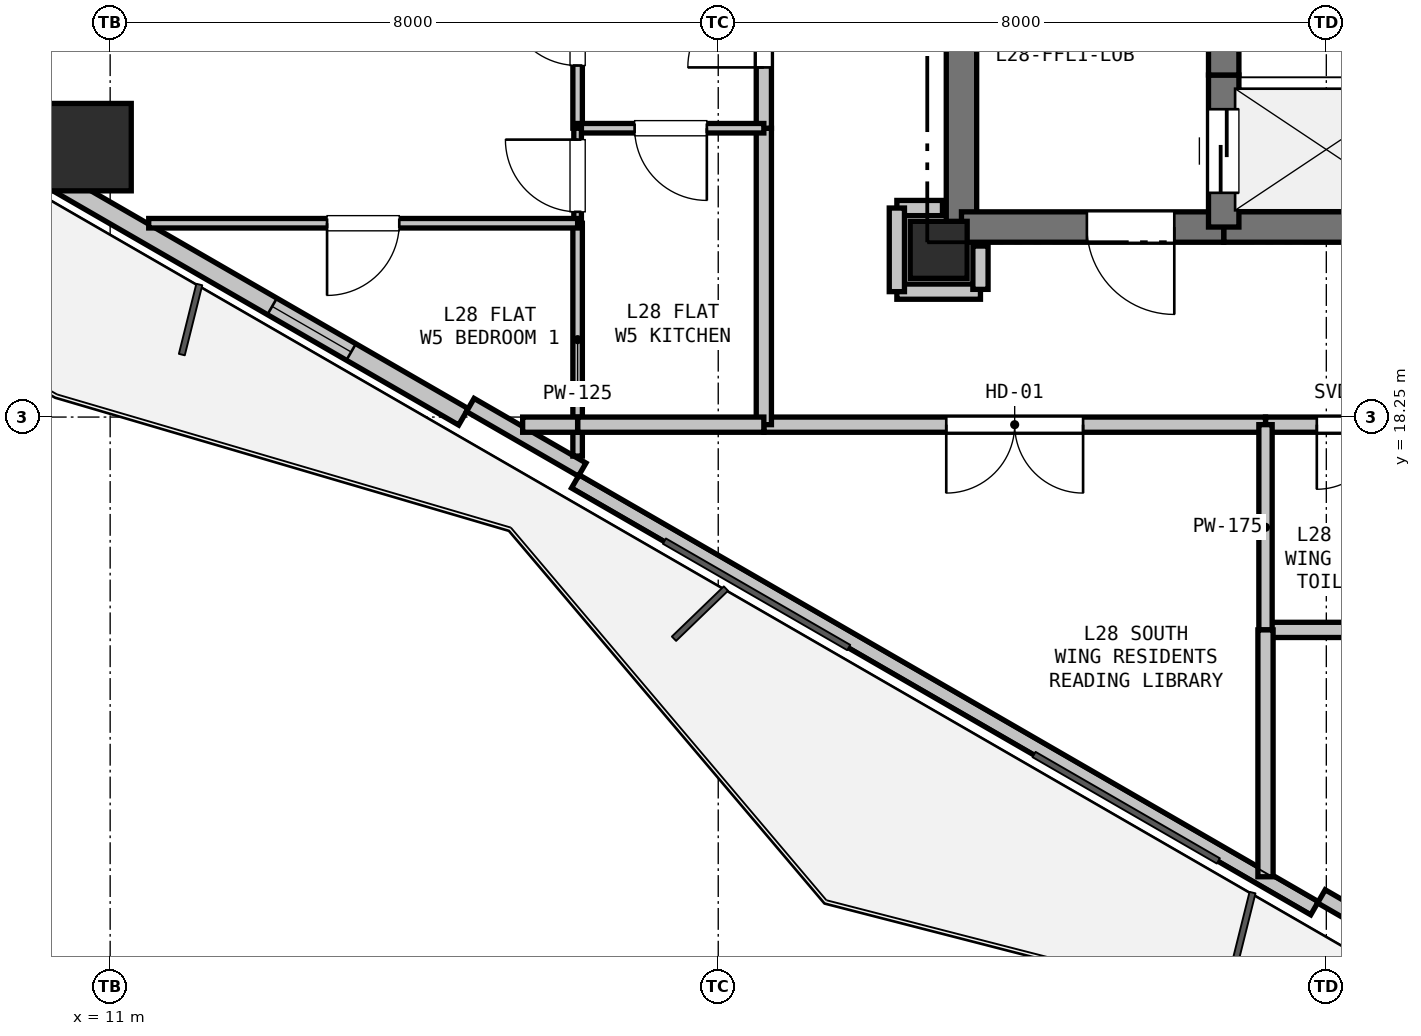
"""IFC4 building model, lengths in metres.
Left out: names, types, materials, properties, quantities, classifications, styles, units other than length and angle.
Written with IfcOpenShell. Run it as: python <this file> out.ifc"""

import sys

from ifc_helpers import new_model, si_unit, direction, frame, frame_2d, origin, origin_2d, place, context, subcontext, project, spatial, rectangle, hollow_rectangle, extrude, element, fill, save


model = new_model("IFC4")
c1 = context("Model", 3, precision=1e-05, world=origin(), true_north=direction((0.0, 1.0)))
c2 = subcontext(c1, "Body", "Model", "MODEL_VIEW")
j1 = project(units=[si_unit("LENGTHUNIT", "METRE"), si_unit("PLANEANGLEUNIT", "RADIAN")], contexts=[c1])
p1 = place(None, origin())
s1 = spatial("IfcSite", under=j1, at=p1, CompositionType="ELEMENT")
p2 = place(p1, origin())
s2 = spatial("IfcBuilding", under=s1, at=p2, CompositionType="ELEMENT")
p3 = place(p2, frame((0.0, 0.0, 103.2)))
s3 = spatial("IfcBuildingStorey", under=s2, at=p3, CompositionType="ELEMENT", Elevation=103.2)
p4 = place(p3, frame((21.9, 20.45, 0.0), z_axis=(0.0, 0.0, 1.0), x_axis=(1.0, 0.0, 0.0)))
e1 = element("IfcColumn", 1, at=p4, inside=s3, PredefinedType="COLUMN", context=c2, shape_type="SweptSolid", body=[
    extrude(rectangle(XDim=0.75, YDim=0.75, at=origin_2d()), origin(), (0.0, 0.0, 1.0), 3.3),
])
p5 = place(p3, frame((10.702, 21.801, 0.0), z_axis=(0.0, 0.0, 1.0), x_axis=(1.0, 0.0, 0.0)))
e2 = element("IfcColumn", 2, at=p5, inside=s3, PredefinedType="COLUMN", context=c2, shape_type="SweptSolid", body=[
    extrude(hollow_rectangle(XDim=1.15, YDim=1.15, WallThickness=0.032, at=origin_2d()), origin(), (0.0, 0.0, 1.0), 3.3),
])
p6 = place(p3, frame((26.845, 11.788, 0.0), z_axis=(0.0, 0.0, 1.0), x_axis=(-0.866027010039, 0.499997217876, 0.0)))
e3 = element("IfcWall", 3, at=p6, inside=s3, PredefinedType="PARAPET", context=c2, shape_type="SweptSolid", body=[
    extrude(rectangle(XDim=11.229, YDim=0.2, at=frame_2d((5.615, 0.0))), origin(), (0.0, 0.0, 1.0), 0.2),
])
p7 = place(p3, frame((15.648, 18.253, 0.0), z_axis=(0.0, 0.0, 1.0), x_axis=(-0.866023023012, 0.500004123596, 0.0)))
e4 = element("IfcWall", 4, at=p7, inside=s3, PredefinedType="SOLIDWALL", context=c2, shape_type="SweptSolid", body=[
    extrude(rectangle(XDim=11.93, YDim=0.25, at=frame_2d((5.965, 0.0))), origin(), (0.0, 0.0, 1.0), 2.67),
])
p8 = place(p7, frame((1.706, 0.0, 0.9)))
e5 = element("IfcOpeningElement", 5, at=p8, cuts=e4, PredefinedType="OPENING", context=c2, shape_type="SweptSolid", body=[
    extrude(rectangle(XDim=1.2, YDim=1.4, at=frame_2d((0.6, 0.7))), frame((0.0, 0.135, 0.0), z_axis=(0.0, -1.0, 0.0), x_axis=(1.0, 0.0, 0.0)), (0.0, 0.0, 1.0), 0.27),
])
p9 = place(p3, frame((28.407, 11.094, 0.0), z_axis=(0.0, 0.0, 1.0), x_axis=(-0.86605165483, 0.499954529098, 0.0)))
e6 = element("IfcWall", 6, at=p9, inside=s3, PredefinedType="PARAPET", context=c2, shape_type="SweptSolid", body=[
    extrude(rectangle(XDim=1.7, YDim=0.2, at=frame_2d((0.85, 0.0))), origin(), (0.0, 0.0, 1.0), 2.67),
])
p10 = place(p3, frame((17.21, 17.559, 0.0), z_axis=(0.0, 0.0, 1.0), x_axis=(-0.866025371046, 0.500000056704, 0.0)))
e7 = element("IfcWall", 7, at=p10, inside=s3, PredefinedType="PARAPET", context=c2, shape_type="SweptSolid", body=[
    extrude(rectangle(XDim=1.7, YDim=0.2, at=frame_2d((0.85, 0.0))), origin(), (0.0, 0.0, 1.0), 2.67),
])
p11 = place(p3, frame((22.2, 20.75, 0.0), z_axis=(0.0, 0.0, 1.0), x_axis=(0.0, 1.0, 0.0)))
e8 = element("IfcWall", 8, at=p11, inside=s3, PredefinedType="SHEAR", context=c2, shape_type="SweptSolid", body=[
    extrude(rectangle(XDim=4.65, YDim=0.4, at=frame_2d((2.325, 0.0))), origin(), (0.0, 0.0, 1.0), 3.05),
])
p12 = place(p3, frame((28.35, 20.75, 0.0), z_axis=(0.0, 0.0, 1.0), x_axis=(-1.0, 0.0, 0.0)))
e9 = element("IfcWall", 9, at=p12, inside=s3, PredefinedType="SHEAR", context=c2, shape_type="SweptSolid", body=[
    extrude(rectangle(XDim=2.7, YDim=0.4, at=frame_2d((1.35, 0.0))), origin(), (0.0, 0.0, 1.0), 3.05),
])
p13 = place(p3, frame((25.65, 20.75, 0.0), z_axis=(0.0, 0.0, 1.0), x_axis=(-1.0, 0.0, 0.0)))
e10 = element("IfcWall", 10, at=p13, inside=s3, PredefinedType="SHEAR", context=c2, shape_type="SweptSolid", body=[
    extrude(rectangle(XDim=3.45, YDim=0.4, at=frame_2d((1.725, 0.0))), origin(), (0.0, 0.0, 1.0), 3.05),
])
p14 = place(p13, frame((0.65, 0.0, 0.0)))
e11 = element("IfcOpeningElement", 11, at=p14, cuts=e10, PredefinedType="OPENING", context=c2, shape_type="SweptSolid", body=[
    extrude(rectangle(XDim=1.15, YDim=2.15, at=frame_2d((0.575, 1.075))), frame((0.0, 0.21, 0.0), z_axis=(0.0, -1.0, 0.0), x_axis=(1.0, 0.0, 0.0)), (0.0, 0.0, 1.0), 0.42),
])
p15 = place(p3, frame((25.65, 20.75, 0.0), z_axis=(0.0, 0.0, 1.0), x_axis=(0.0, 1.0, 0.0)))
e12 = element("IfcWall", 12, at=p15, inside=s3, PredefinedType="SHEAR", context=c2, shape_type="SweptSolid", body=[
    extrude(rectangle(XDim=2.0, YDim=0.4, at=frame_2d((1.0, 0.0))), origin(), (0.0, 0.0, 1.0), 3.05),
])
p16 = place(p15, frame((0.45, 0.0, 0.0)))
e13 = element("IfcOpeningElement", 13, at=p16, cuts=e12, PredefinedType="OPENING", context=c2, shape_type="SweptSolid", body=[
    extrude(rectangle(XDim=1.1, YDim=2.15, at=frame_2d((0.55, 1.075))), frame((0.0, 0.21, 0.0), z_axis=(0.0, -1.0, 0.0), x_axis=(1.0, 0.0, 0.0)), (0.0, 0.0, 1.0), 0.42),
])
p17 = place(p3, frame((25.65, 22.75, 0.0), z_axis=(0.0, 0.0, 1.0), x_axis=(0.0, 1.0, 0.0)))
e14 = element("IfcWall", 14, at=p17, inside=s3, PredefinedType="SHEAR", context=c2, shape_type="SweptSolid", body=[
    extrude(rectangle(XDim=2.8, YDim=0.4, at=frame_2d((1.4, 0.0))), origin(), (0.0, 0.0, 1.0), 3.05),
])
p18 = place(p3, frame((21.35, 19.9, 0.0), z_axis=(0.0, 0.0, 1.0), x_axis=(1.0, 0.0, 0.0)))
e15 = element("IfcWall", 15, at=p18, inside=s3, PredefinedType="PARTITIONING", context=c2, shape_type="SweptSolid", body=[
    extrude(rectangle(XDim=1.1, YDim=0.2, at=frame_2d((0.55, 0.0))), origin(), (0.0, 0.0, 1.0), 2.423),
])
p19 = place(p3, frame((22.45, 19.93, 0.0), z_axis=(0.0, 0.0, 1.0), x_axis=(0.0, 1.0, 0.0)))
e16 = element("IfcWall", 16, at=p19, inside=s3, PredefinedType="PARTITIONING", context=c2, shape_type="SweptSolid", body=[
    extrude(rectangle(XDim=0.57, YDim=0.2, at=frame_2d((0.285, 0.0))), origin(), (0.0, 0.0, 1.0), 2.423),
])
p20 = place(p3, frame((28.4, 18.15, 0.0), z_axis=(0.0, 0.0, 1.0), x_axis=(-1.0, 0.0, 0.0)))
e17 = element("IfcWall", 17, at=p20, inside=s3, PredefinedType="PARTITIONING", context=c2, shape_type="SweptSolid", body=[
    extrude(rectangle(XDim=2.2, YDim=0.2, at=frame_2d((1.1, 0.0))), origin(), (0.0, 0.0, 1.0), 3.05),
])
p21 = place(p20, frame((0.675, 0.0, 0.0)))
e18 = element("IfcOpeningElement", 18, at=p21, cuts=e17, PredefinedType="OPENING", context=c2, shape_type="SweptSolid", body=[
    extrude(rectangle(XDim=0.85, YDim=2.1, at=frame_2d((0.425, 1.05))), frame((0.0, 0.11, 0.0), z_axis=(0.0, -1.0, 0.0), x_axis=(1.0, 0.0, 0.0)), (0.0, 0.0, 1.0), 0.22),
])
p22 = place(p3, frame((26.2, 18.15, 0.0), z_axis=(0.0, 0.0, 1.0), x_axis=(-1.0, 0.0, 0.0)))
e19 = element("IfcWall", 19, at=p22, inside=s3, PredefinedType="PARTITIONING", context=c2, shape_type="SweptSolid", body=[
    extrude(rectangle(XDim=6.6, YDim=0.2, at=frame_2d((3.3, 0.0))), origin(), (0.0, 0.0, 1.0), 2.423),
])
p23 = place(p22, frame((2.4, 0.0, 0.0)))
e20 = element("IfcOpeningElement", 20, at=p23, cuts=e19, PredefinedType="OPENING", context=c2, shape_type="SweptSolid", body=[
    extrude(rectangle(XDim=1.8, YDim=2.2, at=frame_2d((0.9, 1.1))), frame((0.0, 0.11, 0.0), z_axis=(0.0, -1.0, 0.0), x_axis=(1.0, 0.0, 0.0)), (0.0, 0.0, 1.0), 0.22),
])
p24 = place(p3, frame((19.6, 18.15, 0.0), z_axis=(0.0, 0.0, 1.0), x_axis=(0.0, 1.0, 0.0)))
e21 = element("IfcWall", 21, at=p24, inside=s3, PredefinedType="PARTITIONING", context=c2, shape_type="SweptSolid", body=[
    extrude(rectangle(XDim=3.9, YDim=0.2, at=frame_2d((1.95, 0.0))), origin(), (0.0, 0.0, 1.0), 2.423),
])
p25 = place(p3, frame((19.6, 22.05, 0.0), z_axis=(0.0, 0.0, 1.0), x_axis=(0.0, 1.0, 0.0)))
e22 = element("IfcWall", 22, at=p25, inside=s3, PredefinedType="PARTITIONING", context=c2, shape_type="SweptSolid", body=[
    extrude(rectangle(XDim=2.6, YDim=0.2, at=frame_2d((1.3, 0.0))), origin(), (0.0, 0.0, 1.0), 3.05),
])
p26 = place(p25, frame((0.8, 0.0, 0.0)))
e23 = element("IfcOpeningElement", 23, at=p26, cuts=e22, PredefinedType="OPENING", context=c2, shape_type="SweptSolid", body=[
    extrude(rectangle(XDim=1.0, YDim=2.15, at=frame_2d((0.5, 1.075))), frame((0.0, 0.11, 0.0), z_axis=(0.0, -1.0, 0.0), x_axis=(1.0, 0.0, 0.0)), (0.0, 0.0, 1.0), 0.22),
])
p27 = place(p3, frame((21.95, 21.0, 0.0), z_axis=(0.0, 0.0, 1.0), x_axis=(-1.0, 0.0, 0.0)))
e24 = element("IfcWall", 24, at=p27, inside=s3, PredefinedType="PARTITIONING", context=c2, shape_type="SweptSolid", body=[
    extrude(rectangle(XDim=0.6, YDim=0.2, at=frame_2d((0.3, 0.0))), origin(), (0.0, 0.0, 1.0), 2.498),
])
p28 = place(p3, frame((21.35, 21.0, 0.0), z_axis=(0.0, 0.0, 1.0), x_axis=(0.0, -1.0, 0.0)))
e25 = element("IfcWall", 25, at=p28, inside=s3, PredefinedType="PARTITIONING", context=c2, shape_type="SweptSolid", body=[
    extrude(rectangle(XDim=1.1, YDim=0.2, at=frame_2d((0.55, 0.0))), origin(), (0.0, 0.0, 1.0), 2.423),
])
p29 = place(p3, frame((17.15, 22.05, 0.0), z_axis=(0.0, 0.0, 1.0), x_axis=(0.0, 1.0, 0.0)))
e26 = element("IfcWall", 26, at=p29, inside=s3, PredefinedType="PARTITIONING", context=c2, shape_type="SweptSolid", body=[
    extrude(rectangle(XDim=2.6, YDim=0.125, at=frame_2d((1.3, 0.0))), origin(), (0.0, 0.0, 1.0), 3.05),
])
p30 = place(p29, frame((0.825, 0.0, 0.0)))
e27 = element("IfcOpeningElement", 27, at=p30, cuts=e26, PredefinedType="OPENING", context=c2, shape_type="SweptSolid", body=[
    extrude(rectangle(XDim=0.95, YDim=2.1, at=frame_2d((0.475, 1.05))), frame((0.0, 0.073, 0.0), z_axis=(0.0, -1.0, 0.0), x_axis=(1.0, 0.0, 0.0)), (0.0, 0.0, 1.0), 0.145),
])
p31 = place(p3, frame((19.6, 22.05, 0.0), z_axis=(0.0, 0.0, 1.0), x_axis=(-1.0, 0.0, 0.0)))
e28 = element("IfcWall", 28, at=p31, inside=s3, PredefinedType="PARTITIONING", context=c2, shape_type="SweptSolid", body=[
    extrude(rectangle(XDim=2.45, YDim=0.125, at=frame_2d((1.225, 0.0))), origin(), (0.0, 0.0, 1.0), 3.05),
])
p32 = place(p31, frame((0.75, 0.0, 0.0)))
e29 = element("IfcOpeningElement", 29, at=p32, cuts=e28, PredefinedType="OPENING", context=c2, shape_type="SweptSolid", body=[
    extrude(rectangle(XDim=0.95, YDim=2.1, at=frame_2d((0.475, 1.05))), frame((0.0, 0.073, 0.0), z_axis=(0.0, -1.0, 0.0), x_axis=(1.0, 0.0, 0.0)), (0.0, 0.0, 1.0), 0.145),
])
p33 = place(p3, frame((28.4, 15.45, 0.0), z_axis=(0.0, 0.0, 1.0), x_axis=(-1.0, 0.0, 0.0)))
e30 = element("IfcWall", 30, at=p33, inside=s3, PredefinedType="PARTITIONING", context=c2, shape_type="SweptSolid", body=[
    extrude(rectangle(XDim=2.2, YDim=0.2, at=frame_2d((1.1, 0.0))), origin(), (0.0, 0.0, 1.0), 2.423),
])
p34 = place(p3, frame((26.2, 15.45, 0.0), z_axis=(0.0, 0.0, 1.0), x_axis=(0.0, 1.0, 0.0)))
e31 = element("IfcWall", 31, at=p34, inside=s3, PredefinedType="PLUMBINGWALL", context=c2, shape_type="SweptSolid", body=[
    extrude(rectangle(XDim=2.7, YDim=0.175, at=frame_2d((1.35, 0.0))), origin(), (0.0, 0.0, 1.0), 2.423),
])
p35 = place(p3, frame((17.15, 17.737, 0.0), z_axis=(0.0, 0.0, 1.0), x_axis=(0.0, 1.0, 0.0)))
e32 = element("IfcWall", 32, at=p35, inside=s3, PredefinedType="PARTITIONING", context=c2, shape_type="SweptSolid", body=[
    extrude(rectangle(XDim=3.063, YDim=0.125, at=frame_2d((1.532, 0.0))), origin(), (0.0, 0.0, 1.0), 2.365),
])
p36 = place(p3, frame((17.15, 20.8, 0.0), z_axis=(0.0, 0.0, 1.0), x_axis=(0.0, 1.0, 0.0)))
e33 = element("IfcWall", 33, at=p36, inside=s3, PredefinedType="PARTITIONING", context=c2, shape_type="SweptSolid", body=[
    extrude(rectangle(XDim=1.25, YDim=0.1, at=frame_2d((0.625, 0.0))), origin(), (0.0, 0.0, 1.0), 2.423),
])
p37 = place(p36, frame((0.15, 0.0, 0.0)))
e34 = element("IfcOpeningElement", 34, at=p37, cuts=e33, PredefinedType="OPENING", context=c2, shape_type="SweptSolid", body=[
    extrude(rectangle(XDim=0.95, YDim=2.1, at=frame_2d((0.475, 1.05))), frame((0.0, 0.06, 0.0), z_axis=(0.0, -1.0, 0.0), x_axis=(1.0, 0.0, 0.0)), (0.0, 0.0, 1.0), 0.12),
])
p38 = place(p3, frame((19.6, 18.15, 0.0), z_axis=(0.0, 0.0, 1.0), x_axis=(-1.0, 0.0, 0.0)))
e35 = element("IfcWall", 35, at=p38, inside=s3, PredefinedType="PARTITIONING", context=c2, shape_type="SweptSolid", body=[
    extrude(rectangle(XDim=2.45, YDim=0.2, at=frame_2d((1.225, 0.0))), origin(), (0.0, 0.0, 1.0), 2.365),
])
p39 = place(p3, frame((16.427, 18.15, 0.0), z_axis=(0.0, 0.0, 1.0), x_axis=(1.0, 0.0, 0.0)))
e36 = element("IfcWall", 36, at=p39, inside=s3, PredefinedType="PARTITIONING", context=c2, shape_type="SweptSolid", body=[
    extrude(rectangle(XDim=0.723, YDim=0.2, at=frame_2d((0.362, 0.0))), origin(), (0.0, 0.0, 1.0), 2.365),
])
p40 = place(p3, frame((26.2, 15.45, 0.0), z_axis=(0.0, 0.0, 1.0), x_axis=(0.0, -1.0, 0.0)))
e37 = element("IfcWall", 37, at=p40, inside=s3, PredefinedType="PARTITIONING", context=c2, shape_type="SweptSolid", body=[
    extrude(rectangle(XDim=3.248, YDim=0.2, at=frame_2d((1.624, 0.0))), origin(), (0.0, 0.0, 1.0), 2.365),
])
p41 = place(p3, frame((17.15, 20.8, 0.0), z_axis=(0.0, 0.0, 1.0), x_axis=(-1.0, 0.0, 0.0)))
e38 = element("IfcWall", 38, at=p41, inside=s3, PredefinedType="PARTITIONING", context=c2, shape_type="SweptSolid", body=[
    extrude(rectangle(XDim=5.643, YDim=0.125, at=frame_2d((2.821, 0.0))), origin(), (0.0, 0.0, 1.0), 2.365),
])
p42 = place(p41, frame((2.346, 0.0, 0.0)))
e39 = element("IfcOpeningElement", 39, at=p42, cuts=e38, PredefinedType="OPENING", context=c2, shape_type="SweptSolid", body=[
    extrude(rectangle(XDim=0.95, YDim=2.1, at=frame_2d((0.475, 1.05))), frame((0.0, 0.073, 0.0), z_axis=(0.0, -1.0, 0.0), x_axis=(1.0, 0.0, 0.0)), (0.0, 0.0, 1.0), 0.145),
])
p43 = place(p8, origin())
e40 = element("IfcWindow", 40, at=p43, inside=s3, PartitioningType="SINGLE_PANEL", PredefinedType="WINDOW", context=c2, shape_type="SweptSolid", body=[
    extrude(rectangle(XDim=1.2, YDim=1.4, at=frame_2d((0.6, 0.7))), frame((0.0, 0.03, 0.0), z_axis=(0.0, -1.0, 0.0), x_axis=(1.0, 0.0, 0.0)), (0.0, 0.0, 1.0), 0.06),
])
fill(e5, e40)
p44 = place(p16, origin())
e41 = element("IfcDoor", 41, at=p44, inside=s3, OperationType="SLIDING_TO_LEFT", PredefinedType="DOOR", context=c2, shape_type="SweptSolid", body=[
    extrude(rectangle(XDim=1.1, YDim=2.15, at=frame_2d((0.55, 1.075))), frame((0.0, 0.025, 0.0), z_axis=(0.0, -1.0, 0.0), x_axis=(1.0, 0.0, 0.0)), (0.0, 0.0, 1.0), 0.05),
])
fill(e13, e41)
p45 = place(p14, origin())
e42 = element("IfcDoor", 42, at=p45, inside=s3, OperationType="SINGLE_SWING_LEFT", PredefinedType="DOOR", context=c2, shape_type="SweptSolid", body=[
    extrude(rectangle(XDim=1.15, YDim=2.15, at=frame_2d((0.575, 1.075))), frame((0.0, 0.025, 0.0), z_axis=(0.0, -1.0, 0.0), x_axis=(1.0, 0.0, 0.0)), (0.0, 0.0, 1.0), 0.05),
])
fill(e11, e42)
p46 = place(p26, origin())
e43 = element("IfcDoor", 43, at=p46, inside=s3, OperationType="SINGLE_SWING_LEFT", PredefinedType="DOOR", context=c2, shape_type="SweptSolid", body=[
    extrude(rectangle(XDim=1.0, YDim=2.15, at=frame_2d((0.5, 1.075))), frame((0.0, 0.025, 0.0), z_axis=(0.0, -1.0, 0.0), x_axis=(1.0, 0.0, 0.0)), (0.0, 0.0, 1.0), 0.05),
])
fill(e23, e43)
p47 = place(p21, origin())
e44 = element("IfcDoor", 44, at=p47, inside=s3, OperationType="SINGLE_SWING_RIGHT", PredefinedType="DOOR", context=c2, shape_type="SweptSolid", body=[
    extrude(rectangle(XDim=0.85, YDim=2.1, at=frame_2d((0.425, 1.05))), frame((0.0, 0.025, 0.0), z_axis=(0.0, -1.0, 0.0), x_axis=(1.0, 0.0, 0.0)), (0.0, 0.0, 1.0), 0.05),
])
fill(e18, e44)
p48 = place(p23, origin())
e45 = element("IfcDoor", 45, at=p48, inside=s3, OperationType="DOUBLE_DOOR_SINGLE_SWING", PredefinedType="DOOR", context=c2, shape_type="SweptSolid", body=[
    extrude(rectangle(XDim=1.8, YDim=2.2, at=frame_2d((0.9, 1.1))), frame((0.0, 0.025, 0.0), z_axis=(0.0, -1.0, 0.0), x_axis=(1.0, 0.0, 0.0)), (0.0, 0.0, 1.0), 0.05),
])
fill(e20, e45)
p49 = place(p32, origin())
e46 = element("IfcDoor", 46, at=p49, inside=s3, OperationType="SINGLE_SWING_LEFT", PredefinedType="DOOR", context=c2, shape_type="SweptSolid", body=[
    extrude(rectangle(XDim=0.95, YDim=2.1, at=frame_2d((0.475, 1.05))), frame((0.0, 0.025, 0.0), z_axis=(0.0, -1.0, 0.0), x_axis=(1.0, 0.0, 0.0)), (0.0, 0.0, 1.0), 0.05),
])
fill(e29, e46)
p50 = place(p30, origin())
e47 = element("IfcDoor", 47, at=p50, inside=s3, OperationType="SINGLE_SWING_RIGHT", PredefinedType="DOOR", context=c2, shape_type="SweptSolid", body=[
    extrude(rectangle(XDim=0.95, YDim=2.1, at=frame_2d((0.475, 1.05))), frame((0.0, 0.025, 0.0), z_axis=(0.0, -1.0, 0.0), x_axis=(1.0, 0.0, 0.0)), (0.0, 0.0, 1.0), 0.05),
])
fill(e27, e47)
p51 = place(p37, origin())
e48 = element("IfcDoor", 48, at=p51, inside=s3, OperationType="SINGLE_SWING_RIGHT", PredefinedType="DOOR", context=c2, shape_type="SweptSolid", body=[
    extrude(rectangle(XDim=0.95, YDim=2.1, at=frame_2d((0.475, 1.05))), frame((0.0, 0.025, 0.0), z_axis=(0.0, -1.0, 0.0), x_axis=(1.0, 0.0, 0.0)), (0.0, 0.0, 1.0), 0.05),
])
fill(e34, e48)
p52 = place(p42, origin())
e49 = element("IfcDoor", 49, at=p52, inside=s3, OperationType="SINGLE_SWING_RIGHT", PredefinedType="DOOR", context=c2, shape_type="SweptSolid", body=[
    extrude(rectangle(XDim=0.95, YDim=2.1, at=frame_2d((0.475, 1.05))), frame((0.0, 0.025, 0.0), z_axis=(0.0, -1.0, 0.0), x_axis=(1.0, 0.0, 0.0)), (0.0, 0.0, 1.0), 0.05),
])
fill(e39, e49)
save(model, sys.argv[1])
